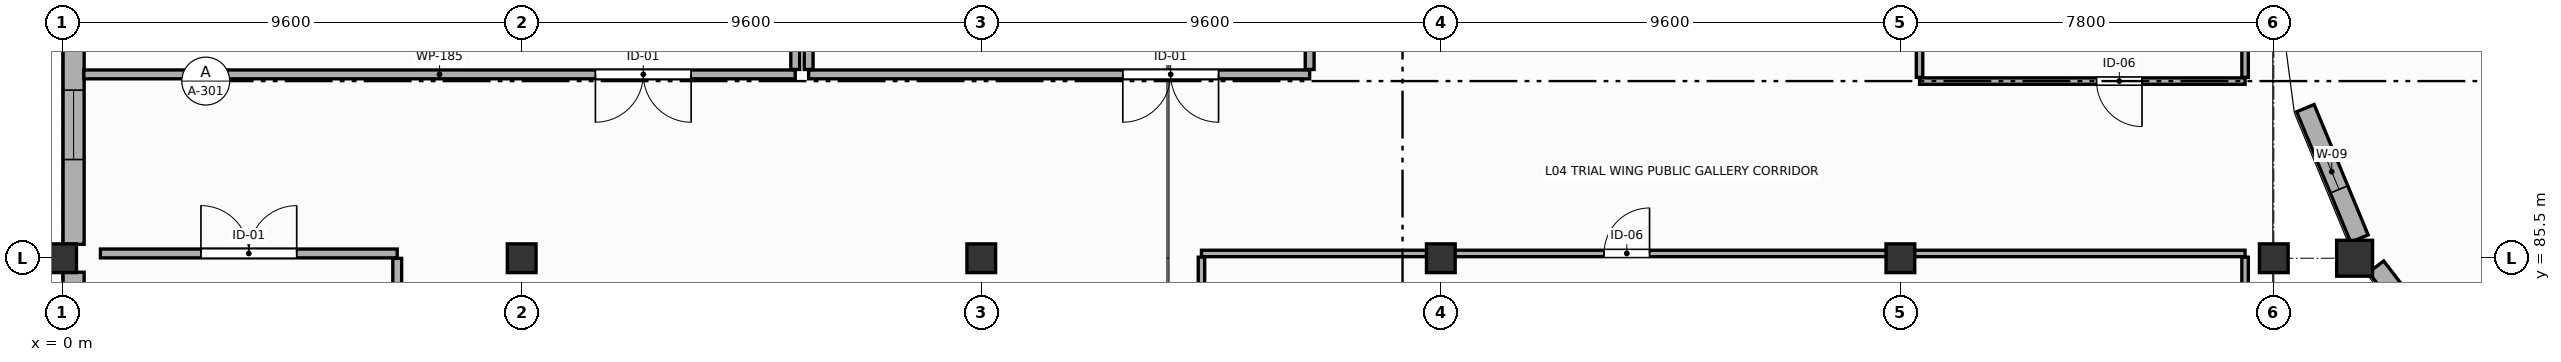
"""IFC4 building model, lengths in metres.
Left out: names, types, materials, properties, quantities, classifications, styles, units other than length and angle.
Written with IfcOpenShell. Run it as: python <this file> out.ifc"""

import sys

from ifc_helpers import new_model, si_unit, direction, frame, frame_2d, origin, origin_2d, place, context, subcontext, project, spatial, rectangle, circle, extrude, element, fill, save


model = new_model("IFC4")
c1 = context("Model", 3, precision=1e-05, world=origin(), true_north=direction((0.0, 1.0)))
c2 = subcontext(c1, "Body", "Model", "MODEL_VIEW")
j1 = project(units=[si_unit("LENGTHUNIT", "METRE"), si_unit("PLANEANGLEUNIT", "RADIAN")], contexts=[c1])
p1 = place(None, origin())
s1 = spatial("IfcSite", under=j1, at=p1, CompositionType="ELEMENT")
p2 = place(p1, origin())
s2 = spatial("IfcBuilding", under=s1, at=p2, CompositionType="ELEMENT")
p3 = place(p2, frame((0.0, 0.0, 14.4)))
s3 = spatial("IfcBuildingStorey", under=s2, at=p3, CompositionType="ELEMENT", Elevation=14.4)
p4 = place(p3, frame((47.888, 85.5, 0.0), z_axis=(0.0, 0.0, 1.0), x_axis=(1.0, 0.0, 0.0)))
e1 = element("IfcColumn", 1, at=p4, inside=s3, PredefinedType="COLUMN", context=c2, shape_type="SweptSolid", body=[
    extrude(circle(Radius=0.375, at=origin_2d()), origin(), (0.0, 0.0, 1.0), 4.2),
])
for number, where, z_axis, x_axis in (
    (2, (0.0, 85.5, 0.0), (0.0, 0.0, 1.0), (1.0, 0.0, 0.0)),
    (3, (9.6, 85.5, 0.0), (0.0, 0.0, 1.0), (1.0, 0.0, 0.0)),
    (4, (19.2, 85.5, 0.0), (0.0, 0.0, 1.0), (1.0, 0.0, 0.0)),
    (5, (28.8, 85.5, 0.0), (0.0, 0.0, 1.0), (1.0, 0.0, 0.0)),
    (6, (38.4, 85.5, 0.0), (0.0, 0.0, 1.0), (1.0, 0.0, 0.0)),
    (7, (46.2, 85.5, 0.0), (0.0, 0.0, 1.0), (1.0, 0.0, 0.0)),
):
    element("IfcColumn", number, at=place(p3, frame(where, z_axis=z_axis, x_axis=x_axis)), inside=s3, PredefinedType="COLUMN", context=c2, shape_type="SweptSolid", body=[
        extrude(rectangle(XDim=0.6, YDim=0.6, at=origin_2d()), origin(), (0.0, 0.0, 1.0), 4.2),
    ])
p5 = place(p3, frame((46.86, 88.635, 0.0), z_axis=(0.0, 0.0, 1.0), x_axis=(0.382632249505, -0.923900731485, 0.0)))
e8 = element("IfcWall", 8, at=p5, inside=s3, PredefinedType="ELEMENTEDWALL", context=c2, shape_type="SweptSolid", body=[
    extrude(rectangle(XDim=2.947, YDim=0.395, at=frame_2d((1.474, 0.0))), origin(), (0.0, 0.0, 1.0), 3.09),
])
p6 = place(p5, frame((1.037, 0.0, 0.85)))
e9 = element("IfcOpeningElement", 9, at=p6, cuts=e8, PredefinedType="OPENING", context=c2, shape_type="SweptSolid", body=[
    extrude(rectangle(XDim=0.8, YDim=1.7, at=frame_2d((0.4, 0.85))), frame((0.0, 0.208, 0.0), z_axis=(0.0, -1.0, 0.0), x_axis=(1.0, 0.0, 0.0)), (0.0, 0.0, 1.0), 0.415),
])
p7 = place(p3, frame((48.339, 85.323, 0.0), z_axis=(0.0, 0.0, 1.0), x_axis=(0.608729278603, -0.79337800913, 0.0)))
e10 = element("IfcWall", 10, at=p7, inside=s3, PredefinedType="ELEMENTEDWALL", context=c2, shape_type="SweptSolid", body=[
    extrude(rectangle(XDim=2.875, YDim=0.395, at=frame_2d((1.437, 0.0))), origin(), (0.0, 0.0, 1.0), 3.09),
])
p8 = place(p7, frame((1.037, 0.0, 0.85)))
e11 = element("IfcOpeningElement", 11, at=p8, cuts=e10, PredefinedType="OPENING", context=c2, shape_type="SweptSolid", body=[
    extrude(rectangle(XDim=0.8, YDim=1.7, at=frame_2d((0.4, 0.85))), frame((0.0, 0.208, 0.0), z_axis=(0.0, -1.0, 0.0), x_axis=(1.0, 0.0, 0.0)), (0.0, 0.0, 1.0), 0.415),
])
p9 = place(p3, frame((0.24, 74.692, 0.0), z_axis=(0.0, 0.0, 1.0), x_axis=(0.0, 1.0, 0.0)))
e12 = element("IfcWall", 12, at=p9, inside=s3, PredefinedType="STANDARD", context=c2, shape_type="SweptSolid", body=[
    extrude(rectangle(XDim=10.516, YDim=0.44, at=frame_2d((5.258, 0.0))), origin(), (0.0, 0.0, 1.0), 3.09),
])
p10 = place(p9, frame((1.52, 0.0, 0.85)))
e13 = element("IfcOpeningElement", 13, at=p10, cuts=e12, PredefinedType="OPENING", context=c2, shape_type="SweptSolid", body=[
    extrude(rectangle(XDim=1.45, YDim=2.05, at=frame_2d((0.725, 1.025))), frame((0.0, 0.23, 0.0), z_axis=(0.0, -1.0, 0.0), x_axis=(1.0, 0.0, 0.0)), (0.0, 0.0, 1.0), 0.46),
])
p11 = place(p9, frame((4.533, 0.0, 0.85)))
e14 = element("IfcOpeningElement", 14, at=p11, cuts=e12, PredefinedType="OPENING", context=c2, shape_type="SweptSolid", body=[
    extrude(rectangle(XDim=1.45, YDim=2.05, at=frame_2d((0.725, 1.025))), frame((0.0, 0.23, 0.0), z_axis=(0.0, -1.0, 0.0), x_axis=(1.0, 0.0, 0.0)), (0.0, 0.0, 1.0), 0.46),
])
p12 = place(p9, frame((7.546, 0.0, 0.85)))
e15 = element("IfcOpeningElement", 15, at=p12, cuts=e12, PredefinedType="OPENING", context=c2, shape_type="SweptSolid", body=[
    extrude(rectangle(XDim=1.45, YDim=2.05, at=frame_2d((0.725, 1.025))), frame((0.0, 0.23, 0.0), z_axis=(0.0, -1.0, 0.0), x_axis=(1.0, 0.0, 0.0)), (0.0, 0.0, 1.0), 0.46),
])
p13 = place(p3, frame((0.24, 85.792, 0.0), z_axis=(0.0, 0.0, 1.0), x_axis=(0.0, 1.0, 0.0)))
e16 = element("IfcWall", 16, at=p13, inside=s3, PredefinedType="STANDARD", context=c2, shape_type="SweptSolid", body=[
    extrude(rectangle(XDim=12.016, YDim=0.44, at=frame_2d((6.008, 0.0))), origin(), (0.0, 0.0, 1.0), 3.04),
])
p14 = place(p13, frame((1.77, 0.0, 0.77)))
e17 = element("IfcOpeningElement", 17, at=p14, cuts=e16, PredefinedType="OPENING", context=c2, shape_type="SweptSolid", body=[
    extrude(rectangle(XDim=1.45, YDim=2.05, at=frame_2d((0.725, 1.025))), frame((0.0, 0.23, 0.0), z_axis=(0.0, -1.0, 0.0), x_axis=(1.0, 0.0, 0.0)), (0.0, 0.0, 1.0), 0.46),
])
p15 = place(p13, frame((5.283, 0.0, 0.77)))
e18 = element("IfcOpeningElement", 18, at=p15, cuts=e16, PredefinedType="OPENING", context=c2, shape_type="SweptSolid", body=[
    extrude(rectangle(XDim=1.45, YDim=2.05, at=frame_2d((0.725, 1.025))), frame((0.0, 0.23, 0.0), z_axis=(0.0, -1.0, 0.0), x_axis=(1.0, 0.0, 0.0)), (0.0, 0.0, 1.0), 0.46),
])
p16 = place(p13, frame((8.796, 0.0, 0.77)))
e19 = element("IfcOpeningElement", 19, at=p16, cuts=e16, PredefinedType="OPENING", context=c2, shape_type="SweptSolid", body=[
    extrude(rectangle(XDim=1.45, YDim=2.05, at=frame_2d((0.725, 1.025))), frame((0.0, 0.23, 0.0), z_axis=(0.0, -1.0, 0.0), x_axis=(1.0, 0.0, 0.0)), (0.0, 0.0, 1.0), 0.46),
])
p17 = place(p3, frame((15.314, 89.34, 0.0), z_axis=(0.0, 0.0, 1.0), x_axis=(-1.0, 0.0, 0.0)))
e20 = element("IfcWall", 20, at=p17, inside=s3, PredefinedType="PARTITIONING", context=c2, shape_type="SweptSolid", body=[
    extrude(rectangle(XDim=14.86, YDim=0.185, at=frame_2d((7.43, 0.0))), origin(), (0.0, 0.0, 1.0), 3.09),
])
p18 = place(p17, frame((2.174, 0.0, 0.0)))
e21 = element("IfcOpeningElement", 21, at=p18, cuts=e20, PredefinedType="OPENING", context=c2, shape_type="SweptSolid", body=[
    extrude(rectangle(XDim=2.0, YDim=2.5, at=frame_2d((1.0, 1.25))), frame((0.0, 0.103, 0.0), z_axis=(0.0, -1.0, 0.0), x_axis=(1.0, 0.0, 0.0)), (0.0, 0.0, 1.0), 0.205),
])
p19 = place(p3, frame((15.314, 112.346, 0.0), z_axis=(0.0, 0.0, 1.0), x_axis=(0.0, -1.0, 0.0)))
e22 = element("IfcWall", 22, at=p19, inside=s3, PredefinedType="PARTITIONING", context=c2, shape_type="SweptSolid", body=[
    extrude(rectangle(XDim=22.904, YDim=0.185, at=frame_2d((11.452, 0.0))), origin(), (0.0, 0.0, 1.0), 3.29),
])
p20 = place(p3, frame((26.06, 89.34, 0.0), z_axis=(0.0, 0.0, 1.0), x_axis=(-1.0, 0.0, 0.0)))
e23 = element("IfcWall", 23, at=p20, inside=s3, PredefinedType="PARTITIONING", context=c2, shape_type="SweptSolid", body=[
    extrude(rectangle(XDim=10.466, YDim=0.185, at=frame_2d((5.233, 0.0))), origin(), (0.0, 0.0, 1.0), 3.09),
])
p21 = place(p20, frame((1.903, 0.0, 0.0)))
e24 = element("IfcOpeningElement", 24, at=p21, cuts=e23, PredefinedType="OPENING", context=c2, shape_type="SweptSolid", body=[
    extrude(rectangle(XDim=2.0, YDim=2.5, at=frame_2d((1.0, 1.25))), frame((0.0, 0.103, 0.0), z_axis=(0.0, -1.0, 0.0), x_axis=(1.0, 0.0, 0.0)), (0.0, 0.0, 1.0), 0.205),
])
for number, where, z_axis, x_axis in (
    (25, (15.594, 89.442, 0.0), (0.0, 0.0, 1.0), (0.0, 1.0, 0.0)),
    (26, (26.06, 97.597, 0.0), (0.0, 0.0, 1.0), (0.0, -1.0, 0.0)),
):
    element("IfcWall", number, at=place(p3, frame(where, z_axis=z_axis, x_axis=x_axis)), inside=s3, PredefinedType="PARTITIONING", context=c2, shape_type="SweptSolid", body=[
        extrude(rectangle(XDim=8.155, YDim=0.185, at=frame_2d((4.078, 0.0))), origin(), (0.0, 0.0, 1.0), 3.34),
    ])
p22 = place(p3, frame((45.6, 89.2, 0.0), z_axis=(0.0, 0.0, 1.0), x_axis=(-1.0, 0.0, 0.0)))
e27 = element("IfcWall", 27, at=p22, inside=s3, PredefinedType="PARTITIONING", context=c2, shape_type="SweptSolid", body=[
    extrude(rectangle(XDim=6.8, YDim=0.135, at=frame_2d((3.4, 0.0))), origin(), (0.0, 0.0, 1.0), 3.09),
])
p23 = place(p22, frame((2.153, 0.0, 0.0)))
e28 = element("IfcOpeningElement", 28, at=p23, cuts=e27, PredefinedType="OPENING", context=c2, shape_type="SweptSolid", body=[
    extrude(rectangle(XDim=0.95, YDim=2.15, at=frame_2d((0.475, 1.075))), frame((0.0, 0.077, 0.0), z_axis=(0.0, -1.0, 0.0), x_axis=(1.0, 0.0, 0.0)), (0.0, 0.0, 1.0), 0.155),
])
p24 = place(p3, frame((38.8, 89.278, 0.0), z_axis=(0.0, 0.0, 1.0), x_axis=(0.0, 1.0, 0.0)))
e29 = element("IfcWall", 29, at=p24, inside=s3, PredefinedType="PARTITIONING", context=c2, shape_type="SweptSolid", body=[
    extrude(rectangle(XDim=12.645, YDim=0.135, at=frame_2d((6.323, 0.0))), origin(), (0.0, 0.0, 1.0), 3.04),
])
p25 = place(p3, frame((45.6, 101.923, 0.0), z_axis=(0.0, 0.0, 1.0), x_axis=(0.0, -1.0, 0.0)))
e30 = element("IfcWall", 30, at=p25, inside=s3, PredefinedType="PARTITIONING", context=c2, shape_type="SweptSolid", body=[
    extrude(rectangle(XDim=12.645, YDim=0.135, at=frame_2d((6.323, 0.0))), origin(), (0.0, 0.0, 1.0), 3.34),
])
p26 = place(p3, frame((0.8, 85.6, 0.0), z_axis=(0.0, 0.0, 1.0), x_axis=(1.0, 0.0, 0.0)))
e31 = element("IfcWall", 31, at=p26, inside=s3, PredefinedType="PARTITIONING", context=c2, shape_type="SweptSolid", body=[
    extrude(rectangle(XDim=6.2, YDim=0.185, at=frame_2d((3.1, 0.0))), origin(), (0.0, 0.0, 1.0), 3.29),
])
p27 = place(p26, frame((2.1, 0.0, 0.0)))
e32 = element("IfcOpeningElement", 32, at=p27, cuts=e31, PredefinedType="OPENING", context=c2, shape_type="SweptSolid", body=[
    extrude(rectangle(XDim=2.0, YDim=2.5, at=frame_2d((1.0, 1.25))), frame((0.0, 0.103, 0.0), z_axis=(0.0, -1.0, 0.0), x_axis=(1.0, 0.0, 0.0)), (0.0, 0.0, 1.0), 0.205),
])
p28 = place(p3, frame((7.0, 85.498, 0.0), z_axis=(0.0, 0.0, 1.0), x_axis=(0.0, -1.0, 0.0)))
e33 = element("IfcWall", 33, at=p28, inside=s3, PredefinedType="PARTITIONING", context=c2, shape_type="SweptSolid", body=[
    extrude(rectangle(XDim=17.844, YDim=0.185, at=frame_2d((8.922, 0.0))), origin(), (0.0, 0.0, 1.0), 3.29),
])
p29 = place(p3, frame((23.8, 85.6, 0.0), z_axis=(0.0, 0.0, 1.0), x_axis=(1.0, 0.0, 0.0)))
e34 = element("IfcWall", 34, at=p29, inside=s3, PredefinedType="PARTITIONING", context=c2, shape_type="SweptSolid", body=[
    extrude(rectangle(XDim=21.8, YDim=0.135, at=frame_2d((10.9, 0.0))), origin(), (0.0, 0.0, 1.0), 3.09),
])
p30 = place(p29, frame((8.41, 0.0, 0.0)))
e35 = element("IfcOpeningElement", 35, at=p30, cuts=e34, PredefinedType="OPENING", context=c2, shape_type="SweptSolid", body=[
    extrude(rectangle(XDim=0.95, YDim=2.15, at=frame_2d((0.475, 1.075))), frame((0.0, 0.077, 0.0), z_axis=(0.0, -1.0, 0.0), x_axis=(1.0, 0.0, 0.0)), (0.0, 0.0, 1.0), 0.155),
])
p31 = place(p3, frame((23.8, 67.654, 0.0), z_axis=(0.0, 0.0, 1.0), x_axis=(0.0, 1.0, 0.0)))
e36 = element("IfcWall", 36, at=p31, inside=s3, PredefinedType="PARTITIONING", context=c2, shape_type="SweptSolid", body=[
    extrude(rectangle(XDim=17.868, YDim=0.135, at=frame_2d((8.934, 0.0))), origin(), (0.0, 0.0, 1.0), 3.29),
])
p32 = place(p3, frame((45.6, 85.522, 0.0), z_axis=(0.0, 0.0, 1.0), x_axis=(0.0, -1.0, 0.0)))
e37 = element("IfcWall", 37, at=p32, inside=s3, PredefinedType="PARTITIONING", context=c2, shape_type="SweptSolid", body=[
    extrude(rectangle(XDim=17.868, YDim=0.135, at=frame_2d((8.934, 0.0))), origin(), (0.0, 0.0, 1.0), 3.39),
])
p33 = place(p6, origin())
e38 = element("IfcWindow", 38, at=p33, inside=s3, PartitioningType="SINGLE_PANEL", PredefinedType="WINDOW", context=c2, shape_type="SweptSolid", body=[
    extrude(rectangle(XDim=0.8, YDim=1.7, at=frame_2d((0.4, 0.85))), frame((0.0, 0.03, 0.0), z_axis=(0.0, -1.0, 0.0), x_axis=(1.0, 0.0, 0.0)), (0.0, 0.0, 1.0), 0.06),
])
fill(e9, e38)
p34 = place(p14, origin())
e39 = element("IfcWindow", 39, at=p34, inside=s3, PartitioningType="SINGLE_PANEL", PredefinedType="WINDOW", context=c2, shape_type="SweptSolid", body=[
    extrude(rectangle(XDim=1.45, YDim=2.05, at=frame_2d((0.725, 1.025))), frame((0.0, 0.03, 0.0), z_axis=(0.0, -1.0, 0.0), x_axis=(1.0, 0.0, 0.0)), (0.0, 0.0, 1.0), 0.06),
])
fill(e17, e39)
p35 = place(p18, origin())
e40 = element("IfcDoor", 40, at=p35, inside=s3, OperationType="DOUBLE_DOOR_SINGLE_SWING", PredefinedType="DOOR", context=c2, shape_type="SweptSolid", body=[
    extrude(rectangle(XDim=2.0, YDim=2.5, at=frame_2d((1.0, 1.25))), frame((0.0, 0.025, 0.0), z_axis=(0.0, -1.0, 0.0), x_axis=(1.0, 0.0, 0.0)), (0.0, 0.0, 1.0), 0.05),
])
fill(e21, e40)
p36 = place(p21, origin())
e41 = element("IfcDoor", 41, at=p36, inside=s3, OperationType="DOUBLE_DOOR_SINGLE_SWING", PredefinedType="DOOR", context=c2, shape_type="SweptSolid", body=[
    extrude(rectangle(XDim=2.0, YDim=2.5, at=frame_2d((1.0, 1.25))), frame((0.0, 0.025, 0.0), z_axis=(0.0, -1.0, 0.0), x_axis=(1.0, 0.0, 0.0)), (0.0, 0.0, 1.0), 0.05),
])
fill(e24, e41)
p37 = place(p23, origin())
e42 = element("IfcDoor", 42, at=p37, inside=s3, OperationType="SINGLE_SWING_LEFT", PredefinedType="DOOR", context=c2, shape_type="SweptSolid", body=[
    extrude(rectangle(XDim=0.95, YDim=2.15, at=frame_2d((0.475, 1.075))), frame((0.0, 0.025, 0.0), z_axis=(0.0, -1.0, 0.0), x_axis=(1.0, 0.0, 0.0)), (0.0, 0.0, 1.0), 0.05),
])
fill(e28, e42)
p38 = place(p27, origin())
e43 = element("IfcDoor", 43, at=p38, inside=s3, OperationType="DOUBLE_DOOR_SINGLE_SWING", PredefinedType="DOOR", context=c2, shape_type="SweptSolid", body=[
    extrude(rectangle(XDim=2.0, YDim=2.5, at=frame_2d((1.0, 1.25))), frame((0.0, 0.025, 0.0), z_axis=(0.0, -1.0, 0.0), x_axis=(1.0, 0.0, 0.0)), (0.0, 0.0, 1.0), 0.05),
])
fill(e32, e43)
p39 = place(p30, origin())
e44 = element("IfcDoor", 44, at=p39, inside=s3, OperationType="SINGLE_SWING_RIGHT", PredefinedType="DOOR", context=c2, shape_type="SweptSolid", body=[
    extrude(rectangle(XDim=0.95, YDim=2.15, at=frame_2d((0.475, 1.075))), frame((0.0, 0.025, 0.0), z_axis=(0.0, -1.0, 0.0), x_axis=(1.0, 0.0, 0.0)), (0.0, 0.0, 1.0), 0.05),
])
fill(e35, e44)
save(model, sys.argv[1])
